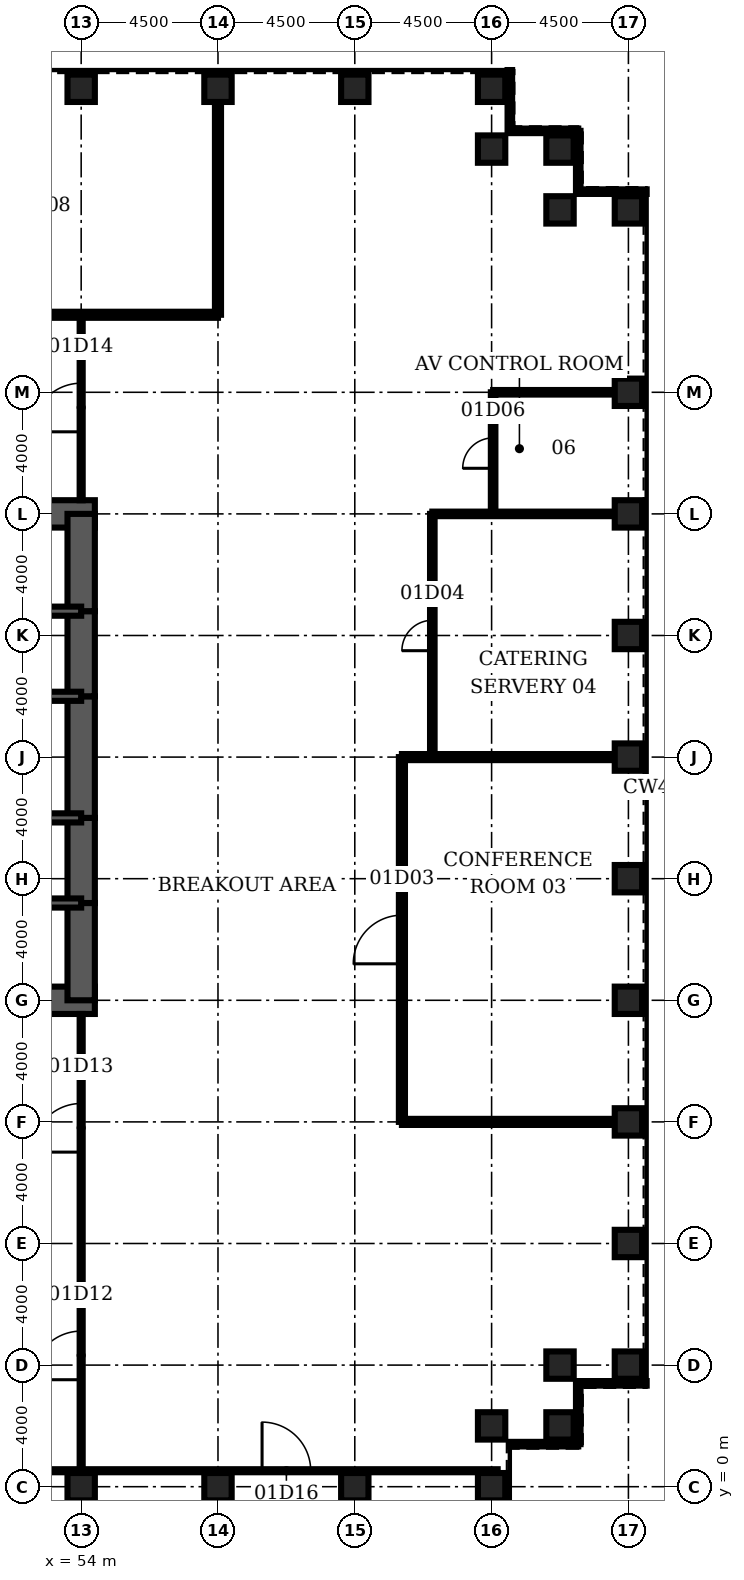
"""IFC4 building model, lengths in metres.
Left out: names, types, materials, properties, quantities, classifications, styles, units other than length and angle.
Written with IfcOpenShell. Run it as: python <this file> out.ifc"""

import sys

from ifc_helpers import new_model, si_unit, direction, frame, frame_2d, origin, origin_2d, place, context, subcontext, project, spatial, rectangle, hollow_rectangle, extrude, element, fill, save


model = new_model("IFC4")
c1 = context("Model", 3, precision=1e-05, world=origin(), true_north=direction((0.0, 1.0)))
c2 = subcontext(c1, "Body", "Model", "MODEL_VIEW")
j1 = project(units=[si_unit("LENGTHUNIT", "METRE"), si_unit("PLANEANGLEUNIT", "RADIAN")], contexts=[c1])
p1 = place(None, origin())
s1 = spatial("IfcSite", under=j1, at=p1, CompositionType="ELEMENT")
p2 = place(p1, origin())
s2 = spatial("IfcBuilding", under=s1, at=p2, CompositionType="ELEMENT")
p3 = place(p2, frame((0.0, 0.0, 6.0)))
s3 = spatial("IfcBuildingStorey", under=s2, at=p3, CompositionType="ELEMENT", Elevation=6.0)
for number, where, z_axis, x_axis in (
    (1, (54.0, 0.0, 0.0), (0.0, 0.0, 1.0), (0.0, 1.0, 0.0)),
    (2, (58.5, 0.0, 0.0), (0.0, 0.0, 1.0), (0.0, 1.0, 0.0)),
    (3, (63.0, 0.0, 0.0), (0.0, 0.0, 1.0), (0.0, 1.0, 0.0)),
    (4, (67.5, 0.0, 0.0), (0.0, 0.0, 1.0), (0.0, 1.0, 0.0)),
    (5, (67.5, 2.0, 0.0), (0.0, 0.0, 1.0), (0.0, 1.0, 0.0)),
    (6, (69.75, 2.0, 0.0), (0.0, 0.0, 1.0), (1.0, 0.0, 0.0)),
    (7, (69.75, 4.0, 0.0), (0.0, 0.0, 1.0), (1.0, 0.0, 0.0)),
    (8, (72.0, 4.0, 0.0), (0.0, 0.0, 1.0), (1.0, 0.0, 0.0)),
    (9, (72.0, 8.0, 0.0), (0.0, 0.0, 1.0), (1.0, 0.0, 0.0)),
    (10, (72.0, 12.0, 0.0), (0.0, 0.0, 1.0), (1.0, 0.0, 0.0)),
    (11, (72.0, 16.0, 0.0), (0.0, 0.0, 1.0), (1.0, 0.0, 0.0)),
    (12, (72.0, 20.0, 0.0), (0.0, 0.0, 1.0), (1.0, 0.0, 0.0)),
    (13, (72.0, 24.0, 0.0), (0.0, 0.0, 1.0), (1.0, 0.0, 0.0)),
    (14, (72.0, 28.0, 0.0), (0.0, 0.0, 1.0), (1.0, 0.0, 0.0)),
    (15, (72.0, 32.0, 0.0), (0.0, 0.0, 1.0), (1.0, 0.0, 0.0)),
    (16, (72.0, 36.0, 0.0), (0.0, 0.0, 1.0), (1.0, 0.0, 0.0)),
    (17, (72.0, 42.0, 0.0), (0.0, 0.0, 1.0), (1.0, 0.0, 0.0)),
    (18, (69.75, 42.0, 0.0), (0.0, 0.0, 1.0), (1.0, 0.0, 0.0)),
    (19, (69.75, 44.0, 0.0), (0.0, 0.0, 1.0), (1.0, 0.0, 0.0)),
    (20, (67.5, 44.0, 0.0), (0.0, 0.0, 1.0), (0.0, 1.0, 0.0)),
    (21, (67.5, 46.0, 0.0), (0.0, 0.0, 1.0), (0.0, 1.0, 0.0)),
    (22, (63.0, 46.0, 0.0), (0.0, 0.0, 1.0), (0.0, 1.0, 0.0)),
    (23, (58.5, 46.0, 0.0), (0.0, 0.0, 1.0), (0.0, 1.0, 0.0)),
    (24, (54.0, 46.0, 0.0), (0.0, 0.0, 1.0), (0.0, 1.0, 0.0)),
):
    element("IfcColumn", number, at=place(p3, frame(where, z_axis=z_axis, x_axis=x_axis)), inside=s3, PredefinedType="COLUMN", context=c2, shape_type="SweptSolid", body=[
        extrude(hollow_rectangle(XDim=0.9, YDim=0.9, WallThickness=0.12, at=origin_2d()), origin(), (0.0, 0.0, 1.0), 7.0),
    ])
for number, where, z_axis, x_axis in (
    (25, (45.0, 16.0, 0.0), (0.0, 0.0, 1.0), (1.0, 0.0, 0.0)),
    (26, (54.45, 32.0, 0.0), (0.0, 0.0, 1.0), (-1.0, 0.0, 0.0)),
):
    element("IfcWall", number, at=place(p3, frame(where, z_axis=z_axis, x_axis=x_axis)), inside=s3, PredefinedType="SHEAR", context=c2, shape_type="SweptSolid", body=[
        extrude(rectangle(XDim=9.45, YDim=0.9, at=frame_2d((4.725, 0.0))), origin(), (0.0, 0.0, 1.0), 7.0),
    ])
p4 = place(p3, frame((54.0, 16.0, 0.0), z_axis=(0.0, 0.0, 1.0), x_axis=(0.0, 1.0, 0.0)))
e27 = element("IfcWall", 27, at=p4, inside=s3, PredefinedType="SHEAR", context=c2, shape_type="SweptSolid", body=[
    extrude(rectangle(XDim=3.2, YDim=0.9, at=frame_2d((1.6, 0.0))), origin(), (0.0, 0.0, 1.0), 7.0),
])
p5 = place(p3, frame((54.0, 19.2, 0.0), z_axis=(0.0, 0.0, 1.0), x_axis=(0.0, 1.0, 0.0)))
e28 = element("IfcWall", 28, at=p5, inside=s3, PredefinedType="SHEAR", context=c2, shape_type="SweptSolid", body=[
    extrude(rectangle(XDim=2.8, YDim=0.9, at=frame_2d((1.4, 0.0))), origin(), (0.0, 0.0, 1.0), 7.0),
])
p6 = place(p5, frame((0.4, 0.0, 0.0)))
e29 = element("IfcOpeningElement", 29, at=p6, cuts=e28, PredefinedType="OPENING", context=c2, shape_type="SweptSolid", body=[
    extrude(rectangle(XDim=1.8, YDim=2.1, at=frame_2d((0.9, 1.05))), frame((0.0, 0.46, 0.0), z_axis=(0.0, -1.0, 0.0), x_axis=(1.0, 0.0, 0.0)), (0.0, 0.0, 1.0), 0.92),
])
p7 = place(p3, frame((54.0, 22.0, 0.0), z_axis=(0.0, 0.0, 1.0), x_axis=(0.0, 1.0, 0.0)))
e30 = element("IfcWall", 30, at=p7, inside=s3, PredefinedType="SHEAR", context=c2, shape_type="SweptSolid", body=[
    extrude(rectangle(XDim=4.0, YDim=0.9, at=frame_2d((2.0, 0.0))), origin(), (0.0, 0.0, 1.0), 7.0),
])
p8 = place(p3, frame((54.0, 26.0, 0.0), z_axis=(0.0, 0.0, 1.0), x_axis=(0.0, 1.0, 0.0)))
e31 = element("IfcWall", 31, at=p8, inside=s3, PredefinedType="SHEAR", context=c2, shape_type="SweptSolid", body=[
    extrude(rectangle(XDim=2.8, YDim=0.9, at=frame_2d((1.4, 0.0))), origin(), (0.0, 0.0, 1.0), 7.0),
])
p9 = place(p8, frame((0.6, 0.0, 0.0)))
e32 = element("IfcOpeningElement", 32, at=p9, cuts=e31, PredefinedType="OPENING", context=c2, shape_type="SweptSolid", body=[
    extrude(rectangle(XDim=1.8, YDim=2.1, at=frame_2d((0.9, 1.05))), frame((0.0, 0.46, 0.0), z_axis=(0.0, -1.0, 0.0), x_axis=(1.0, 0.0, 0.0)), (0.0, 0.0, 1.0), 0.92),
])
p10 = place(p3, frame((54.0, 28.8, 0.0), z_axis=(0.0, 0.0, 1.0), x_axis=(0.0, 1.0, 0.0)))
e33 = element("IfcWall", 33, at=p10, inside=s3, PredefinedType="SHEAR", context=c2, shape_type="SweptSolid", body=[
    extrude(rectangle(XDim=3.2, YDim=0.9, at=frame_2d((1.6, 0.0))), origin(), (0.0, 0.0, 1.0), 7.0),
])
p11 = place(p3, frame((45.0, 19.2, 0.0), z_axis=(0.0, 0.0, 1.0), x_axis=(1.0, 0.0, 0.0)))
e34 = element("IfcWall", 34, at=p11, inside=s3, PredefinedType="SOLIDWALL", context=c2, shape_type="SweptSolid", body=[
    extrude(rectangle(XDim=9.0, YDim=0.3, at=frame_2d((4.5, 0.0))), origin(), (0.0, 0.0, 1.0), 7.0),
])
p12 = place(p11, frame((7.35, 0.0, 0.0)))
e35 = element("IfcOpeningElement", 35, at=p12, cuts=e34, PredefinedType="OPENING", context=c2, shape_type="SweptSolid", body=[
    extrude(rectangle(XDim=1.0, YDim=2.1, at=frame_2d((0.5, 1.05))), frame((0.0, 0.16, 0.0), z_axis=(0.0, -1.0, 0.0), x_axis=(1.0, 0.0, 0.0)), (0.0, 0.0, 1.0), 0.32),
])
p13 = place(p3, frame((45.0, 28.8, 0.0), z_axis=(0.0, 0.0, 1.0), x_axis=(1.0, 0.0, 0.0)))
e36 = element("IfcWall", 36, at=p13, inside=s3, PredefinedType="SOLIDWALL", context=c2, shape_type="SweptSolid", body=[
    extrude(rectangle(XDim=9.0, YDim=0.3, at=frame_2d((4.5, 0.0))), origin(), (0.0, 0.0, 1.0), 7.0),
])
p14 = place(p13, frame((7.35, 0.0, 0.0)))
e37 = element("IfcOpeningElement", 37, at=p14, cuts=e36, PredefinedType="OPENING", context=c2, shape_type="SweptSolid", body=[
    extrude(rectangle(XDim=1.0, YDim=2.1, at=frame_2d((0.5, 1.05))), frame((0.0, 0.16, 0.0), z_axis=(0.0, -1.0, 0.0), x_axis=(1.0, 0.0, 0.0)), (0.0, 0.0, 1.0), 0.32),
])
p15 = place(p3, frame((48.0, 22.0, 0.0), z_axis=(0.0, 0.0, 1.0), x_axis=(1.0, 0.0, 0.0)))
e38 = element("IfcWall", 38, at=p15, inside=s3, PredefinedType="SOLIDWALL", context=c2, shape_type="SweptSolid", body=[
    extrude(rectangle(XDim=6.0, YDim=0.3, at=frame_2d((3.0, 0.0))), origin(), (0.0, 0.0, 1.0), 7.0),
])
p16 = place(p15, frame((2.0, 0.0, 0.0)))
e39 = element("IfcOpeningElement", 39, at=p16, cuts=e38, PredefinedType="OPENING", context=c2, shape_type="SweptSolid", body=[
    extrude(rectangle(XDim=1.0, YDim=2.1, at=frame_2d((0.5, 1.05))), frame((0.0, 0.16, 0.0), z_axis=(0.0, -1.0, 0.0), x_axis=(1.0, 0.0, 0.0)), (0.0, 0.0, 1.0), 0.32),
])
p17 = place(p15, frame((4.3, 0.0, 0.0)))
e40 = element("IfcOpeningElement", 40, at=p17, cuts=e38, PredefinedType="OPENING", context=c2, shape_type="SweptSolid", body=[
    extrude(rectangle(XDim=1.0, YDim=2.1, at=frame_2d((0.5, 1.05))), frame((0.0, 0.16, 0.0), z_axis=(0.0, -1.0, 0.0), x_axis=(1.0, 0.0, 0.0)), (0.0, 0.0, 1.0), 0.32),
])
p18 = place(p3, frame((48.0, 26.0, 0.0), z_axis=(0.0, 0.0, 1.0), x_axis=(1.0, 0.0, 0.0)))
e41 = element("IfcWall", 41, at=p18, inside=s3, PredefinedType="SOLIDWALL", context=c2, shape_type="SweptSolid", body=[
    extrude(rectangle(XDim=6.0, YDim=0.3, at=frame_2d((3.0, 0.0))), origin(), (0.0, 0.0, 1.0), 7.0),
])
for number, where, z_axis, x_axis in (
    (42, (64.55, 12.0, 0.0), (0.0, 0.0, 1.0), (1.0, 0.0, 0.0)),
    (43, (64.55, 24.0, 0.0), (0.0, 0.0, 1.0), (1.0, 0.0, 0.0)),
):
    element("IfcWall", number, at=place(p3, frame(where, z_axis=z_axis, x_axis=x_axis)), inside=s3, PredefinedType="PARTITIONING", context=c2, shape_type="SweptSolid", body=[
        extrude(rectangle(XDim=7.0, YDim=0.2, at=frame_2d((3.5, 0.0))), origin(), (0.0, 0.0, 1.0), 3.0),
    ])
p19 = place(p3, frame((65.55, 32.0, 0.0), z_axis=(0.0, 0.0, 1.0), x_axis=(1.0, 0.0, 0.0)))
e44 = element("IfcWall", 44, at=p19, inside=s3, PredefinedType="PARTITIONING", context=c2, shape_type="SweptSolid", body=[
    extrude(rectangle(XDim=6.0, YDim=0.15, at=frame_2d((3.0, 0.0))), origin(), (0.0, 0.0, 1.0), 3.0),
])
p20 = place(p3, frame((67.55, 36.0, 0.0), z_axis=(0.0, 0.0, 1.0), x_axis=(1.0, 0.0, 0.0)))
e45 = element("IfcWall", 45, at=p20, inside=s3, PredefinedType="PARTITIONING", context=c2, shape_type="SweptSolid", body=[
    extrude(rectangle(XDim=4.0, YDim=0.15, at=frame_2d((2.0, 0.0))), origin(), (0.0, 0.0, 1.0), 3.0),
])
p21 = place(p3, frame((40.5, 38.55, 0.0), z_axis=(0.0, 0.0, 1.0), x_axis=(1.0, 0.0, 0.0)))
e46 = element("IfcWall", 46, at=p21, inside=s3, PredefinedType="PARTITIONING", context=c2, shape_type="SweptSolid", body=[
    extrude(rectangle(XDim=18.0, YDim=0.2, at=frame_2d((9.0, 0.0))), origin(), (0.0, 0.0, 1.0), 3.0),
])
p22 = place(p21, frame((8.2, 0.0, 0.0)))
e47 = element("IfcOpeningElement", 47, at=p22, cuts=e46, PredefinedType="OPENING", context=c2, shape_type="SweptSolid", body=[
    extrude(rectangle(XDim=1.6, YDim=2.1, at=frame_2d((0.8, 1.05))), frame((0.0, 0.11, 0.0), z_axis=(0.0, -1.0, 0.0), x_axis=(1.0, 0.0, 0.0)), (0.0, 0.0, 1.0), 0.22),
])
p23 = place(p3, frame((54.0, 0.575, 0.0), z_axis=(0.0, 0.0, 1.0), x_axis=(0.0, 1.0, 0.0)))
e48 = element("IfcWall", 48, at=p23, inside=s3, PredefinedType="PARTITIONING", context=c2, shape_type="SweptSolid", body=[
    extrude(rectangle(XDim=14.975, YDim=0.1, at=frame_2d((7.488, 0.0))), origin(), (0.0, 0.0, 1.0), 3.0),
])
p24 = place(p23, frame((2.944, 0.0, 0.0)))
e49 = element("IfcOpeningElement", 49, at=p24, cuts=e48, PredefinedType="OPENING", context=c2, shape_type="SweptSolid", body=[
    extrude(rectangle(XDim=1.6, YDim=2.1, at=frame_2d((0.8, 1.05))), frame((0.0, 0.06, 0.0), z_axis=(0.0, -1.0, 0.0), x_axis=(1.0, 0.0, 0.0)), (0.0, 0.0, 1.0), 0.12),
])
p25 = place(p23, frame((10.431, 0.0, 0.0)))
e50 = element("IfcOpeningElement", 50, at=p25, cuts=e48, PredefinedType="OPENING", context=c2, shape_type="SweptSolid", body=[
    extrude(rectangle(XDim=1.6, YDim=2.1, at=frame_2d((0.8, 1.05))), frame((0.0, 0.06, 0.0), z_axis=(0.0, -1.0, 0.0), x_axis=(1.0, 0.0, 0.0)), (0.0, 0.0, 1.0), 0.12),
])
p26 = place(p3, frame((54.0, 32.45, 0.0), z_axis=(0.0, 0.0, 1.0), x_axis=(0.0, 1.0, 0.0)))
e51 = element("IfcWall", 51, at=p26, inside=s3, PredefinedType="PARTITIONING", context=c2, shape_type="SweptSolid", body=[
    extrude(rectangle(XDim=6.1, YDim=0.1, at=frame_2d((3.05, 0.0))), origin(), (0.0, 0.0, 1.0), 3.0),
])
p27 = place(p26, frame((2.25, 0.0, 0.0)))
e52 = element("IfcOpeningElement", 52, at=p27, cuts=e51, PredefinedType="OPENING", context=c2, shape_type="SweptSolid", body=[
    extrude(rectangle(XDim=1.6, YDim=2.1, at=frame_2d((0.8, 1.05))), frame((0.0, 0.06, 0.0), z_axis=(0.0, -1.0, 0.0), x_axis=(1.0, 0.0, 0.0)), (0.0, 0.0, 1.0), 0.12),
])
p28 = place(p3, frame((58.5, 38.55, 0.0), z_axis=(0.0, 0.0, 1.0), x_axis=(0.0, 1.0, 0.0)))
e53 = element("IfcWall", 53, at=p28, inside=s3, PredefinedType="PARTITIONING", context=c2, shape_type="SweptSolid", body=[
    extrude(rectangle(XDim=7.0, YDim=0.2, at=frame_2d((3.5, 0.0))), origin(), (0.0, 0.0, 1.0), 3.0),
])
p29 = place(p3, frame((64.55, 12.0, 0.0), z_axis=(0.0, 0.0, 1.0), x_axis=(0.0, 1.0, 0.0)))
e54 = element("IfcWall", 54, at=p29, inside=s3, PredefinedType="PARTITIONING", context=c2, shape_type="SweptSolid", body=[
    extrude(rectangle(XDim=12.0, YDim=0.2, at=frame_2d((6.0, 0.0))), origin(), (0.0, 0.0, 1.0), 3.0),
])
p30 = place(p29, frame((5.2, 0.0, 0.0)))
e55 = element("IfcOpeningElement", 55, at=p30, cuts=e54, PredefinedType="OPENING", context=c2, shape_type="SweptSolid", body=[
    extrude(rectangle(XDim=1.6, YDim=2.1, at=frame_2d((0.8, 1.05))), frame((0.0, 0.11, 0.0), z_axis=(0.0, -1.0, 0.0), x_axis=(1.0, 0.0, 0.0)), (0.0, 0.0, 1.0), 0.22),
])
p31 = place(p3, frame((65.55, 24.0, 0.0), z_axis=(0.0, 0.0, 1.0), x_axis=(0.0, 1.0, 0.0)))
e56 = element("IfcWall", 56, at=p31, inside=s3, PredefinedType="PARTITIONING", context=c2, shape_type="SweptSolid", body=[
    extrude(rectangle(XDim=8.0, YDim=0.15, at=frame_2d((4.0, 0.0))), origin(), (0.0, 0.0, 1.0), 3.0),
])
p32 = place(p31, frame((3.5, 0.0, 0.0)))
e57 = element("IfcOpeningElement", 57, at=p32, cuts=e56, PredefinedType="OPENING", context=c2, shape_type="SweptSolid", body=[
    extrude(rectangle(XDim=1.0, YDim=2.1, at=frame_2d((0.5, 1.05))), frame((0.0, 0.085, 0.0), z_axis=(0.0, -1.0, 0.0), x_axis=(1.0, 0.0, 0.0)), (0.0, 0.0, 1.0), 0.17),
])
p33 = place(p3, frame((67.55, 32.0, 0.0), z_axis=(0.0, 0.0, 1.0), x_axis=(0.0, 1.0, 0.0)))
e58 = element("IfcWall", 58, at=p33, inside=s3, PredefinedType="PARTITIONING", context=c2, shape_type="SweptSolid", body=[
    extrude(rectangle(XDim=4.0, YDim=0.15, at=frame_2d((2.0, 0.0))), origin(), (0.0, 0.0, 1.0), 3.0),
])
p34 = place(p33, frame((1.5, 0.0, 0.0)))
e59 = element("IfcOpeningElement", 59, at=p34, cuts=e58, PredefinedType="OPENING", context=c2, shape_type="SweptSolid", body=[
    extrude(rectangle(XDim=1.0, YDim=2.1, at=frame_2d((0.5, 1.05))), frame((0.0, 0.085, 0.0), z_axis=(0.0, -1.0, 0.0), x_axis=(1.0, 0.0, 0.0)), (0.0, 0.0, 1.0), 0.17),
])
p35 = place(p3, frame((49.5, 0.525, 0.0), z_axis=(0.0, 0.0, 1.0), x_axis=(1.0, 0.0, 0.0)))
e60 = element("IfcWall", 60, at=p35, inside=s3, PredefinedType="PARTITIONING", context=c2, shape_type="SweptSolid", body=[
    extrude(rectangle(XDim=18.2, YDim=0.1, at=frame_2d((9.1, 0.0))), origin(), (0.0, 0.0, 1.0), 3.0),
])
p36 = place(p35, frame((10.45, 0.0, 0.0)))
e61 = element("IfcOpeningElement", 61, at=p36, cuts=e60, PredefinedType="OPENING", context=c2, shape_type="SweptSolid", body=[
    extrude(rectangle(XDim=1.6, YDim=2.1, at=frame_2d((0.8, 1.05))), frame((0.0, 0.06, 0.0), z_axis=(0.0, -1.0, 0.0), x_axis=(1.0, 0.0, 0.0)), (0.0, 0.0, 1.0), 0.12),
])
p37 = place(p3, frame((68.1, 1.4, 0.0), z_axis=(0.0, 0.0, 1.0), x_axis=(1.0, 0.0, 0.0)))
e62 = element("IfcWall", 62, at=p37, inside=s3, PredefinedType="ELEMENTEDWALL", context=c2, shape_type="SweptSolid", body=[
    extrude(rectangle(XDim=2.25, YDim=0.15, at=frame_2d((1.125, 0.0))), origin(), (0.0, 0.0, 1.0), 6.82),
])
p38 = place(p3, frame((70.35, 1.4, 0.0), z_axis=(0.0, 0.0, 1.0), x_axis=(0.0, 1.0, 0.0)))
e63 = element("IfcWall", 63, at=p38, inside=s3, PredefinedType="ELEMENTEDWALL", context=c2, shape_type="SweptSolid", body=[
    extrude(rectangle(XDim=2.0, YDim=0.15, at=frame_2d((1.0, 0.0))), origin(), (0.0, 0.0, 1.0), 6.82),
])
for number, where, z_axis, x_axis in (
    (64, (70.35, 3.4, 0.0), (0.0, 0.0, 1.0), (1.0, 0.0, 0.0)),
    (65, (72.6, 42.6, 0.0), (0.0, 0.0, 1.0), (-1.0, 0.0, 0.0)),
):
    element("IfcWall", number, at=place(p3, frame(where, z_axis=z_axis, x_axis=x_axis)), inside=s3, PredefinedType="ELEMENTEDWALL", context=c2, shape_type="SweptSolid", body=[
        extrude(rectangle(XDim=2.25, YDim=0.15, at=frame_2d((1.125, 0.0))), origin(), (0.0, 0.0, 1.0), 6.82),
    ])
p39 = place(p3, frame((70.35, 42.6, 0.0), z_axis=(0.0, 0.0, 1.0), x_axis=(0.0, 1.0, 0.0)))
e66 = element("IfcWall", 66, at=p39, inside=s3, PredefinedType="ELEMENTEDWALL", context=c2, shape_type="SweptSolid", body=[
    extrude(rectangle(XDim=2.0, YDim=0.15, at=frame_2d((1.0, 0.0))), origin(), (0.0, 0.0, 1.0), 6.82),
])
p40 = place(p3, frame((70.35, 44.6, 0.0), z_axis=(0.0, 0.0, 1.0), x_axis=(-1.0, 0.0, 0.0)))
e67 = element("IfcWall", 67, at=p40, inside=s3, PredefinedType="ELEMENTEDWALL", context=c2, shape_type="SweptSolid", body=[
    extrude(rectangle(XDim=2.25, YDim=0.15, at=frame_2d((1.125, 0.0))), origin(), (0.0, 0.0, 1.0), 6.82),
])
p41 = place(p3, frame((68.1, 44.6, 0.0), z_axis=(0.0, 0.0, 1.0), x_axis=(0.0, 1.0, 0.0)))
e68 = element("IfcWall", 68, at=p41, inside=s3, PredefinedType="ELEMENTEDWALL", context=c2, shape_type="SweptSolid", body=[
    extrude(rectangle(XDim=2.0, YDim=0.15, at=frame_2d((1.0, 0.0))), origin(), (0.0, 0.0, 1.0), 6.82),
])
p42 = place(p30, origin())
e69 = element("IfcDoor", 69, at=p42, inside=s3, OperationType="SINGLE_SWING_LEFT", PredefinedType="DOOR", context=c2, shape_type="SweptSolid", body=[
    extrude(rectangle(XDim=1.6, YDim=2.1, at=frame_2d((0.8, 1.05))), frame((0.0, 0.025, 0.0), z_axis=(0.0, -1.0, 0.0), x_axis=(1.0, 0.0, 0.0)), (0.0, 0.0, 1.0), 0.05),
])
fill(e55, e69)
p43 = place(p32, origin())
e70 = element("IfcDoor", 70, at=p43, inside=s3, OperationType="SINGLE_SWING_LEFT", PredefinedType="DOOR", context=c2, shape_type="SweptSolid", body=[
    extrude(rectangle(XDim=1.0, YDim=2.1, at=frame_2d((0.5, 1.05))), frame((0.0, 0.025, 0.0), z_axis=(0.0, -1.0, 0.0), x_axis=(1.0, 0.0, 0.0)), (0.0, 0.0, 1.0), 0.05),
])
fill(e57, e70)
p44 = place(p34, origin())
e71 = element("IfcDoor", 71, at=p44, inside=s3, OperationType="SINGLE_SWING_LEFT", PredefinedType="DOOR", context=c2, shape_type="SweptSolid", body=[
    extrude(rectangle(XDim=1.0, YDim=2.1, at=frame_2d((0.5, 1.05))), frame((0.0, 0.025, 0.0), z_axis=(0.0, -1.0, 0.0), x_axis=(1.0, 0.0, 0.0)), (0.0, 0.0, 1.0), 0.05),
])
fill(e59, e71)
p45 = place(p24, origin())
e72 = element("IfcDoor", 72, at=p45, inside=s3, OperationType="SINGLE_SWING_LEFT", PredefinedType="DOOR", context=c2, shape_type="SweptSolid", body=[
    extrude(rectangle(XDim=1.6, YDim=2.1, at=frame_2d((0.8, 1.05))), frame((0.0, 0.025, 0.0), z_axis=(0.0, -1.0, 0.0), x_axis=(1.0, 0.0, 0.0)), (0.0, 0.0, 1.0), 0.05),
])
fill(e49, e72)
p46 = place(p25, origin())
e73 = element("IfcDoor", 73, at=p46, inside=s3, OperationType="SINGLE_SWING_LEFT", PredefinedType="DOOR", context=c2, shape_type="SweptSolid", body=[
    extrude(rectangle(XDim=1.6, YDim=2.1, at=frame_2d((0.8, 1.05))), frame((0.0, 0.025, 0.0), z_axis=(0.0, -1.0, 0.0), x_axis=(1.0, 0.0, 0.0)), (0.0, 0.0, 1.0), 0.05),
])
fill(e50, e73)
p47 = place(p27, origin())
e74 = element("IfcDoor", 74, at=p47, inside=s3, OperationType="SINGLE_SWING_LEFT", PredefinedType="DOOR", context=c2, shape_type="SweptSolid", body=[
    extrude(rectangle(XDim=1.6, YDim=2.1, at=frame_2d((0.8, 1.05))), frame((0.0, 0.025, 0.0), z_axis=(0.0, -1.0, 0.0), x_axis=(1.0, 0.0, 0.0)), (0.0, 0.0, 1.0), 0.05),
])
fill(e52, e74)
p48 = place(p36, origin())
e75 = element("IfcDoor", 75, at=p48, inside=s3, OperationType="SINGLE_SWING_LEFT", PredefinedType="DOOR", context=c2, shape_type="SweptSolid", body=[
    extrude(rectangle(XDim=1.6, YDim=2.1, at=frame_2d((0.8, 1.05))), frame((0.0, 0.025, 0.0), z_axis=(0.0, -1.0, 0.0), x_axis=(1.0, 0.0, 0.0)), (0.0, 0.0, 1.0), 0.05),
])
fill(e61, e75)
p49 = place(p12, origin())
e76 = element("IfcDoor", 76, at=p49, inside=s3, OperationType="SINGLE_SWING_RIGHT", PredefinedType="DOOR", context=c2, shape_type="SweptSolid", body=[
    extrude(rectangle(XDim=1.0, YDim=2.1, at=frame_2d((0.5, 1.05))), frame((0.0, 0.025, 0.0), z_axis=(0.0, -1.0, 0.0), x_axis=(1.0, 0.0, 0.0)), (0.0, 0.0, 1.0), 0.05),
])
fill(e35, e76)
p50 = place(p14, origin())
e77 = element("IfcDoor", 77, at=p50, inside=s3, OperationType="SINGLE_SWING_RIGHT", PredefinedType="DOOR", context=c2, shape_type="SweptSolid", body=[
    extrude(rectangle(XDim=1.0, YDim=2.1, at=frame_2d((0.5, 1.05))), frame((0.0, 0.025, 0.0), z_axis=(0.0, -1.0, 0.0), x_axis=(1.0, 0.0, 0.0)), (0.0, 0.0, 1.0), 0.05),
])
fill(e37, e77)
p51 = place(p6, origin())
e78 = element("IfcDoor", 78, at=p51, inside=s3, OperationType="SINGLE_SWING_LEFT", PredefinedType="DOOR", context=c2, shape_type="SweptSolid", body=[
    extrude(rectangle(XDim=1.8, YDim=2.1, at=frame_2d((0.9, 1.05))), frame((0.0, 0.45, 0.0), z_axis=(0.0, -1.0, 0.0), x_axis=(1.0, 0.0, 0.0)), (0.0, 0.0, 1.0), 0.899),
])
fill(e29, e78)
p52 = place(p9, origin())
e79 = element("IfcDoor", 79, at=p52, inside=s3, OperationType="SINGLE_SWING_LEFT", PredefinedType="DOOR", context=c2, shape_type="SweptSolid", body=[
    extrude(rectangle(XDim=1.8, YDim=2.1, at=frame_2d((0.9, 1.05))), frame((0.0, 0.45, 0.0), z_axis=(0.0, -1.0, 0.0), x_axis=(1.0, 0.0, 0.0)), (0.0, 0.0, 1.0), 0.899),
])
fill(e32, e79)
p53 = place(p17, origin())
e80 = element("IfcDoor", 80, at=p53, inside=s3, OperationType="SINGLE_SWING_RIGHT", PredefinedType="DOOR", context=c2, shape_type="SweptSolid", body=[
    extrude(rectangle(XDim=1.0, YDim=2.1, at=frame_2d((0.5, 1.05))), frame((0.0, 0.025, 0.0), z_axis=(0.0, -1.0, 0.0), x_axis=(1.0, 0.0, 0.0)), (0.0, 0.0, 1.0), 0.05),
])
fill(e40, e80)
save(model, sys.argv[1])
